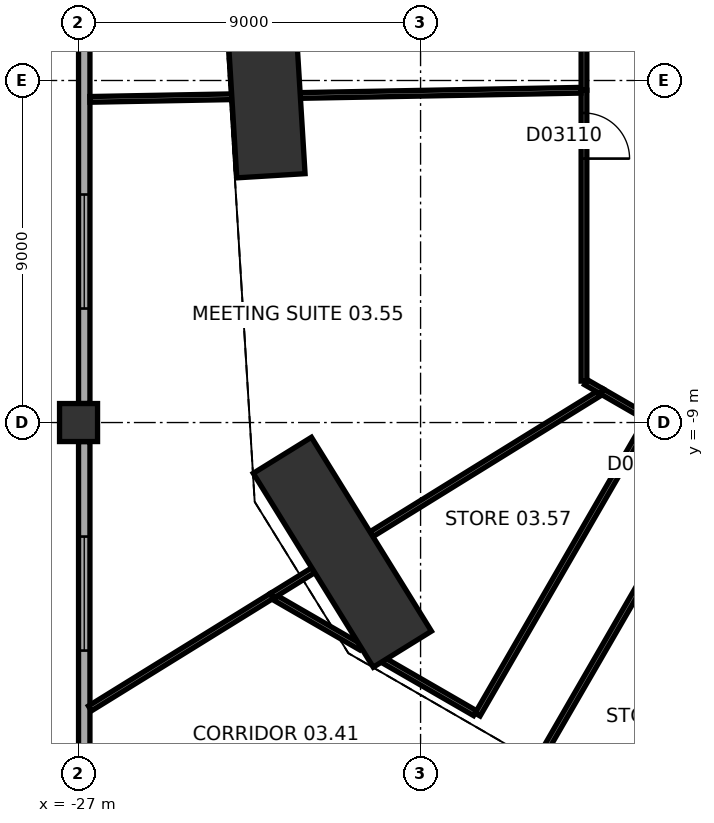
"""IFC4 building model, lengths in metres.
Left out: names, types, materials, properties, quantities, classifications, styles, units other than length and angle.
Written with IfcOpenShell. Run it as: python <this file> out.ifc"""

import sys

from ifc_helpers import new_model, si_unit, direction, frame, frame_2d, origin, origin_2d, place, context, subcontext, project, spatial, rectangle, extrude, element, fill, save


model = new_model("IFC4")
c1 = context("Model", 3, precision=1e-05, world=origin(), true_north=direction((0.0, 1.0)))
c2 = subcontext(c1, "Body", "Model", "MODEL_VIEW")
j1 = project(units=[si_unit("LENGTHUNIT", "METRE"), si_unit("PLANEANGLEUNIT", "RADIAN")], contexts=[c1])
p1 = place(None, origin())
s1 = spatial("IfcSite", under=j1, at=p1, CompositionType="ELEMENT")
p2 = place(p1, origin())
s2 = spatial("IfcBuilding", under=s1, at=p2, CompositionType="ELEMENT")
p3 = place(p2, frame((0.0, 0.0, 21.0)))
s3 = spatial("IfcBuildingStorey", under=s2, at=p3, CompositionType="ELEMENT", Elevation=21.0)
p4 = place(p3, frame((-22.066, -0.411, 0.0), z_axis=(0.0, 0.0, 1.0), x_axis=(0.061046797461, -0.99813490497, 0.0)))
e1 = element("IfcColumn", 1, at=p4, inside=s3, PredefinedType="COLUMN", context=c2, shape_type="SweptSolid", body=[
    extrude(rectangle(XDim=4.2, YDim=1.8, at=origin_2d()), origin(), (0.0, 0.0, 1.0), 8.0),
])
p5 = place(p3, frame((-20.058, -12.413, 0.0), z_axis=(0.0, 0.0, 1.0), x_axis=(0.526202050444, -0.850359572245, 0.0)))
e2 = element("IfcColumn", 2, at=p5, inside=s3, PredefinedType="COLUMN", context=c2, shape_type="SweptSolid", body=[
    extrude(rectangle(XDim=6.0, YDim=1.8, at=origin_2d()), origin(), (0.0, 0.0, 1.0), 8.0),
])
p6 = place(p3, frame((-27.0, -9.0, 0.0), z_axis=(0.0, 0.0, 1.0), x_axis=(1.0, 0.0, 0.0)))
e3 = element("IfcColumn", 3, at=p6, inside=s3, PredefinedType="COLUMN", context=c2, shape_type="SweptSolid", body=[
    extrude(rectangle(XDim=1.0, YDim=1.0, at=origin_2d()), origin(), (0.0, 0.0, 1.0), 8.0),
])
p7 = place(p3, frame((-26.85, 8.5, 0.0), z_axis=(0.0, 0.0, 1.0), x_axis=(0.0, -1.0, 0.0)))
e4 = element("IfcWall", 4, at=p7, inside=s3, PredefinedType="STANDARD", context=c2, shape_type="SweptSolid", body=[
    extrude(rectangle(XDim=17.0, YDim=0.3, at=frame_2d((8.5, 0.0))), origin(), (0.0, 0.0, 1.0), 6.5),
])
p8 = place(p7, frame((2.5, 0.0, 1.0)))
e5 = element("IfcOpeningElement", 5, at=p8, cuts=e4, PredefinedType="OPENING", context=c2, shape_type="SweptSolid", body=[
    extrude(rectangle(XDim=3.0, YDim=4.0, at=frame_2d((1.5, 2.0))), frame((0.0, 0.16, 0.0), z_axis=(0.0, -1.0, 0.0), x_axis=(1.0, 0.0, 0.0)), (0.0, 0.0, 1.0), 0.32),
])
p9 = place(p7, frame((11.5, 0.0, 1.0)))
e6 = element("IfcOpeningElement", 6, at=p9, cuts=e4, PredefinedType="OPENING", context=c2, shape_type="SweptSolid", body=[
    extrude(rectangle(XDim=3.0, YDim=4.0, at=frame_2d((1.5, 2.0))), frame((0.0, 0.16, 0.0), z_axis=(0.0, -1.0, 0.0), x_axis=(1.0, 0.0, 0.0)), (0.0, 0.0, 1.0), 0.32),
])
p10 = place(p3, frame((-26.85, -9.5, 0.0), z_axis=(0.0, 0.0, 1.0), x_axis=(0.0, -1.0, 0.0)))
e7 = element("IfcWall", 7, at=p10, inside=s3, PredefinedType="STANDARD", context=c2, shape_type="SweptSolid", body=[
    extrude(rectangle(XDim=17.0, YDim=0.3, at=frame_2d((8.5, 0.0))), origin(), (0.0, 0.0, 1.0), 6.5),
])
p11 = place(p10, frame((2.5, 0.0, 1.0)))
e8 = element("IfcOpeningElement", 8, at=p11, cuts=e7, PredefinedType="OPENING", context=c2, shape_type="SweptSolid", body=[
    extrude(rectangle(XDim=3.0, YDim=4.0, at=frame_2d((1.5, 2.0))), frame((0.0, 0.16, 0.0), z_axis=(0.0, -1.0, 0.0), x_axis=(1.0, 0.0, 0.0)), (0.0, 0.0, 1.0), 0.32),
])
p12 = place(p10, frame((12.75, 0.0, 1.0)))
e9 = element("IfcOpeningElement", 9, at=p12, cuts=e7, PredefinedType="OPENING", context=c2, shape_type="SweptSolid", body=[
    extrude(rectangle(XDim=3.0, YDim=4.0, at=frame_2d((1.5, 2.0))), frame((0.0, 0.16, 0.0), z_axis=(0.0, -1.0, 0.0), x_axis=(1.0, 0.0, 0.0)), (0.0, 0.0, 1.0), 0.32),
])
p13 = place(p3, frame((-16.568, -16.646, 0.0), z_axis=(0.0, 0.0, 1.0), x_axis=(-0.866023907196, 0.500002592159, 0.0)))
e10 = element("IfcWall", 10, at=p13, inside=s3, PredefinedType="PARTITIONING", context=c2, shape_type="SweptSolid", body=[
    extrude(rectangle(XDim=2.766, YDim=0.15, at=frame_2d((1.383, 0.0))), origin(), (0.0, 0.0, 1.0), 6.2),
])
p14 = place(p3, frame((-19.569, -14.913, 0.0), z_axis=(0.0, 0.0, 1.0), x_axis=(-0.86602679452, 0.499997591167, 0.0)))
e11 = element("IfcWall", 11, at=p14, inside=s3, PredefinedType="PARTITIONING", context=c2, shape_type="SweptSolid", body=[
    extrude(rectangle(XDim=2.586, YDim=0.15, at=frame_2d((1.293, 0.0))), origin(), (0.0, 0.0, 1.0), 7.7),
])
p15 = place(p3, frame((-21.913, -13.56, 0.0), z_axis=(0.0, 0.0, 1.0), x_axis=(-0.850348316199, -0.526220240145, 0.0)))
e12 = element("IfcWall", 12, at=p15, inside=s3, PredefinedType="PARTITIONING", context=c2, shape_type="SweptSolid", body=[
    extrude(rectangle(XDim=5.63, YDim=0.15, at=frame_2d((2.815, 0.0))), origin(), (0.0, 0.0, 1.0), 7.7),
])
p16 = place(p3, frame((-21.909, -13.557, 0.0), z_axis=(0.0, 0.0, 1.0), x_axis=(0.850354848775, 0.526209683648, 0.0)))
e13 = element("IfcWall", 13, at=p16, inside=s3, PredefinedType="PARTITIONING", context=c2, shape_type="SweptSolid", body=[
    extrude(rectangle(XDim=1.276, YDim=0.15, at=frame_2d((0.638, 0.0))), origin(), (0.0, 0.0, 1.0), 7.7),
])
p17 = place(p3, frame((-19.293, -11.939, 0.0), z_axis=(0.0, 0.0, 1.0), x_axis=(0.850368954936, 0.526186887408, 0.0)))
e14 = element("IfcWall", 14, at=p17, inside=s3, PredefinedType="PARTITIONING", context=c2, shape_type="SweptSolid", body=[
    extrude(rectangle(XDim=7.016, YDim=0.15, at=frame_2d((3.508, 0.0))), origin(), (0.0, 0.0, 1.0), 7.7),
])
p18 = place(p3, frame((-10.438, -10.198, 0.0), z_axis=(0.0, 0.0, 1.0), x_axis=(-0.500407402803, -0.865790061862, 0.0)))
e15 = element("IfcWall", 15, at=p18, inside=s3, PredefinedType="PARTITIONING", context=c2, shape_type="SweptSolid", body=[
    extrude(rectangle(XDim=8.648, YDim=0.15, at=frame_2d((4.324, 0.0))), origin(), (0.0, 0.0, 1.0), 7.7),
])
p19 = place(p3, frame((-12.17, -9.197, 0.0), z_axis=(0.0, 0.0, 1.0), x_axis=(-0.500567740603, -0.865697370371, 0.0)))
e16 = element("IfcWall", 16, at=p19, inside=s3, PredefinedType="PARTITIONING", context=c2, shape_type="SweptSolid", body=[
    extrude(rectangle(XDim=8.649, YDim=0.15, at=frame_2d((4.324, 0.0))), origin(), (0.0, 0.0, 1.0), 7.7),
])
p20 = place(p19, frame((0.25, 0.0, 0.0)))
e17 = element("IfcOpeningElement", 17, at=p20, cuts=e16, PredefinedType="OPENING", context=c2, shape_type="SweptSolid", body=[
    extrude(rectangle(XDim=1.0, YDim=2.1, at=frame_2d((0.5, 1.05))), frame((0.0, 0.085, 0.0), z_axis=(0.0, -1.0, 0.0), x_axis=(1.0, 0.0, 0.0)), (0.0, 0.0, 1.0), 0.17),
])
p21 = place(p3, frame((-12.064, -8.854, 0.0), z_axis=(0.0, 0.0, 1.0), x_axis=(-0.866127963163, 0.499822319857, 0.0)))
e18 = element("IfcWall", 18, at=p21, inside=s3, PredefinedType="PARTITIONING", context=c2, shape_type="SweptSolid", body=[
    extrude(rectangle(XDim=1.34, YDim=0.15, at=frame_2d((0.67, 0.0))), origin(), (0.0, 0.0, 1.0), 7.7),
])
p22 = place(p3, frame((-13.648, -7.939, 0.0), z_axis=(0.0, 0.0, 1.0), x_axis=(0.865585916185, -0.500760443428, 0.0)))
e19 = element("IfcWall", 19, at=p22, inside=s3, PredefinedType="PARTITIONING", context=c2, shape_type="SweptSolid", body=[
    extrude(rectangle(XDim=0.489, YDim=0.15, at=frame_2d((0.244, 0.0))), origin(), (0.0, 0.0, 1.0), 7.7),
])
p23 = place(p3, frame((-13.7, -7.909, 0.0), z_axis=(0.0, 0.0, 1.0), x_axis=(0.0, 1.0, 0.0)))
e20 = element("IfcWall", 20, at=p23, inside=s3, PredefinedType="PARTITIONING", context=c2, shape_type="SweptSolid", body=[
    extrude(rectangle(XDim=7.655, YDim=0.15, at=frame_2d((3.827, 0.0))), origin(), (0.0, 0.0, 1.0), 7.7),
])
p24 = place(p23, frame((5.854, 0.0, 0.0)))
e21 = element("IfcOpeningElement", 21, at=p24, cuts=e20, PredefinedType="OPENING", context=c2, shape_type="SweptSolid", body=[
    extrude(rectangle(XDim=1.2, YDim=2.1, at=frame_2d((0.6, 1.05))), frame((0.0, 0.085, 0.0), z_axis=(0.0, -1.0, 0.0), x_axis=(1.0, 0.0, 0.0)), (0.0, 0.0, 1.0), 0.17),
])
p25 = place(p3, frame((-22.967, -0.427, 0.0), z_axis=(0.0, 0.0, 1.0), x_axis=(-0.999826372694, -0.018633959993, 0.0)))
e22 = element("IfcWall", 22, at=p25, inside=s3, PredefinedType="PARTITIONING", context=c2, shape_type="SweptSolid", body=[
    extrude(rectangle(XDim=3.734, YDim=0.15, at=frame_2d((1.867, 0.0))), origin(), (0.0, 0.0, 1.0), 7.7),
])
p26 = place(p3, frame((-13.78, -0.257, 0.0), z_axis=(0.0, 0.0, 1.0), x_axis=(-0.999826849708, -0.018608347649, 0.0)))
e23 = element("IfcWall", 23, at=p26, inside=s3, PredefinedType="PARTITIONING", context=c2, shape_type="SweptSolid", body=[
    extrude(rectangle(XDim=7.386, YDim=0.15, at=frame_2d((3.693, 0.0))), origin(), (0.0, 0.0, 1.0), 7.7),
])
p27 = place(p3, frame((-13.7, -0.255, 0.0), z_axis=(0.0, 0.0, 1.0), x_axis=(0.0, 1.0, 0.0)))
e24 = element("IfcWall", 24, at=p27, inside=s3, PredefinedType="PARTITIONING", context=c2, shape_type="SweptSolid", body=[
    extrude(rectangle(XDim=7.616, YDim=0.15, at=frame_2d((3.808, 0.0))), origin(), (0.0, 0.0, 1.0), 7.7),
])
p28 = place(p27, frame((5.866, 0.0, 0.0)))
e25 = element("IfcOpeningElement", 25, at=p28, cuts=e24, PredefinedType="OPENING", context=c2, shape_type="SweptSolid", body=[
    extrude(rectangle(XDim=1.2, YDim=2.1, at=frame_2d((0.6, 1.05))), frame((0.0, 0.085, 0.0), z_axis=(0.0, -1.0, 0.0), x_axis=(1.0, 0.0, 0.0)), (0.0, 0.0, 1.0), 0.17),
])
p29 = place(p9, origin())
e26 = element("IfcWindow", 26, at=p29, inside=s3, PartitioningType="SINGLE_PANEL", PredefinedType="WINDOW", context=c2, shape_type="SweptSolid", body=[
    extrude(rectangle(XDim=3.0, YDim=4.0, at=frame_2d((1.5, 2.0))), frame((0.0, 0.03, 0.0), z_axis=(0.0, -1.0, 0.0), x_axis=(1.0, 0.0, 0.0)), (0.0, 0.0, 1.0), 0.06),
])
fill(e6, e26)
p30 = place(p11, origin())
e27 = element("IfcWindow", 27, at=p30, inside=s3, PartitioningType="SINGLE_PANEL", PredefinedType="WINDOW", context=c2, shape_type="SweptSolid", body=[
    extrude(rectangle(XDim=3.0, YDim=4.0, at=frame_2d((1.5, 2.0))), frame((0.0, 0.03, 0.0), z_axis=(0.0, -1.0, 0.0), x_axis=(1.0, 0.0, 0.0)), (0.0, 0.0, 1.0), 0.06),
])
fill(e8, e27)
p31 = place(p20, origin())
e28 = element("IfcDoor", 28, at=p31, inside=s3, OperationType="SINGLE_SWING_LEFT", PredefinedType="DOOR", context=c2, shape_type="SweptSolid", body=[
    extrude(rectangle(XDim=1.0, YDim=2.1, at=frame_2d((0.5, 1.05))), frame((0.0, 0.025, 0.0), z_axis=(0.0, -1.0, 0.0), x_axis=(1.0, 0.0, 0.0)), (0.0, 0.0, 1.0), 0.05),
])
fill(e17, e28)
p32 = place(p24, origin())
e29 = element("IfcDoor", 29, at=p32, inside=s3, OperationType="SINGLE_SWING_LEFT", PredefinedType="DOOR", context=c2, shape_type="SweptSolid", body=[
    extrude(rectangle(XDim=1.2, YDim=2.1, at=frame_2d((0.6, 1.05))), frame((0.0, 0.025, 0.0), z_axis=(0.0, -1.0, 0.0), x_axis=(1.0, 0.0, 0.0)), (0.0, 0.0, 1.0), 0.05),
])
fill(e21, e29)
save(model, sys.argv[1])
